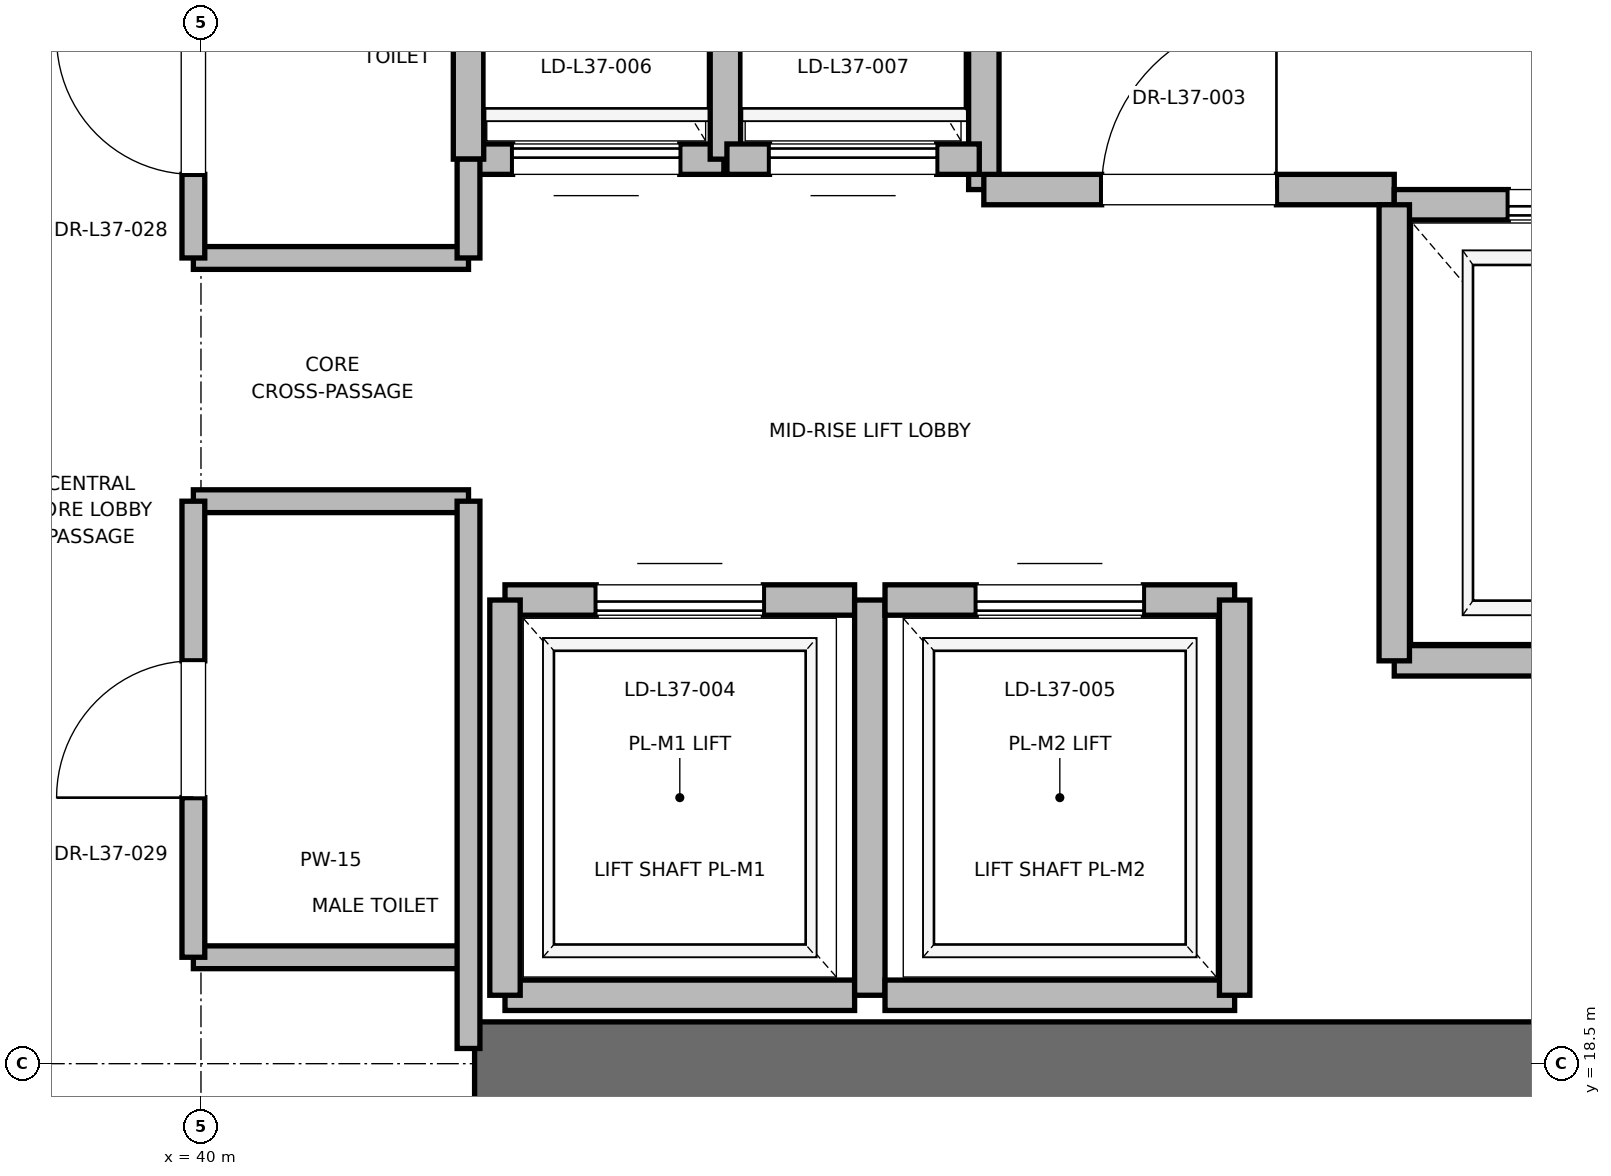
"""IFC4 building model, lengths in metres.
Left out: names, types, materials, properties, quantities, classifications, styles, units other than length and angle.
Written with IfcOpenShell. Run it as: python <this file> out.ifc"""

import sys

from ifc_helpers import new_model, si_unit, direction, frame, frame_2d, origin, place, context, subcontext, project, spatial, rectangle, extrude, element, fill, save


model = new_model("IFC4")
c1 = context("Model", 3, precision=1e-05, world=origin(), true_north=direction((0.0, 1.0)))
c2 = subcontext(c1, "Body", "Model", "MODEL_VIEW")
j1 = project(units=[si_unit("LENGTHUNIT", "METRE"), si_unit("PLANEANGLEUNIT", "RADIAN")], contexts=[c1])
p1 = place(None, origin())
s1 = spatial("IfcSite", under=j1, at=p1, CompositionType="ELEMENT")
p2 = place(p1, origin())
s2 = spatial("IfcBuilding", under=s1, at=p2, CompositionType="ELEMENT")
p3 = place(p2, frame((0.0, 0.0, 160.4)))
s3 = spatial("IfcBuildingStorey", under=s2, at=p3, CompositionType="ELEMENT", Elevation=160.4)
p4 = place(p3, frame((41.8, 18.5, 0.0), z_axis=(0.0, 0.0, 1.0), x_axis=(1.0, 0.0, 0.0)))
e1 = element("IfcWall", 1, at=p4, inside=s3, PredefinedType="SHEAR", context=c2, shape_type="SweptSolid", body=[
    extrude(rectangle(XDim=9.2, YDim=0.55, at=frame_2d((4.6, 0.0))), origin(), (0.0, 0.0, 1.0), 3.775),
])
p5 = place(p3, frame((45.15, 24.25, 0.0), z_axis=(0.0, 0.0, 1.0), x_axis=(0.0, 1.0, 0.0)))
e2 = element("IfcWall", 2, at=p5, inside=s3, PredefinedType="PARTITIONING", context=c2, shape_type="SweptSolid", body=[
    extrude(rectangle(XDim=3.37, YDim=0.2, at=frame_2d((1.685, 0.0))), origin(), (0.0, 0.0, 1.0), 3.775),
])
p6 = place(p3, frame((45.15, 24.25, 0.0), z_axis=(0.0, 0.0, 1.0), x_axis=(1.0, 0.0, 0.0)))
e3 = element("IfcWall", 3, at=p6, inside=s3, PredefinedType="PARTITIONING", context=c2, shape_type="SweptSolid", body=[
    extrude(rectangle(XDim=2.7, YDim=0.2, at=frame_2d((1.35, 0.0))), origin(), (0.0, 0.0, 1.0), 3.775),
])
p7 = place(p6, frame((0.775, 0.0, 0.0)))
e4 = element("IfcOpeningElement", 4, at=p7, cuts=e3, PredefinedType="OPENING", context=c2, shape_type="SweptSolid", body=[
    extrude(rectangle(XDim=1.15, YDim=2.2, at=frame_2d((0.575, 1.1))), frame((0.0, 0.1, 0.0), z_axis=(0.0, -1.0, 0.0), x_axis=(1.0, 0.0, 0.0)), (0.0, 0.0, 1.0), 0.2),
])
p8 = place(p3, frame((47.85, 21.15, 0.0), z_axis=(0.0, 0.0, 1.0), x_axis=(1.0, 0.0, 0.0)))
e5 = element("IfcWall", 5, at=p8, inside=s3, PredefinedType="SOLIDWALL", context=c2, shape_type="SweptSolid", body=[
    extrude(rectangle(XDim=2.6, YDim=0.2, at=frame_2d((1.3, 0.0))), origin(), (0.0, 0.0, 1.0), 3.775),
])
p9 = place(p3, frame((50.45, 24.15, 0.0), z_axis=(0.0, 0.0, 1.0), x_axis=(-1.0, 0.0, 0.0)))
e6 = element("IfcWall", 6, at=p9, inside=s3, PredefinedType="SOLIDWALL", context=c2, shape_type="SweptSolid", body=[
    extrude(rectangle(XDim=2.6, YDim=0.2, at=frame_2d((1.3, 0.0))), origin(), (0.0, 0.0, 1.0), 2.755),
])
p10 = place(p9, frame((0.75, 0.0, 0.0)))
e7 = element("IfcOpeningElement", 7, at=p10, cuts=e6, PredefinedType="OPENING", context=c2, shape_type="SweptSolid", body=[
    extrude(rectangle(XDim=1.1, YDim=2.2, at=frame_2d((0.55, 1.1))), frame((0.0, 0.1, 0.0), z_axis=(0.0, -1.0, 0.0), x_axis=(1.0, 0.0, 0.0)), (0.0, 0.0, 1.0), 0.2),
])
p11 = place(p3, frame((47.85, 24.15, 0.0), z_axis=(0.0, 0.0, 1.0), x_axis=(0.0, -1.0, 0.0)))
e8 = element("IfcWall", 8, at=p11, inside=s3, PredefinedType="SOLIDWALL", context=c2, shape_type="SweptSolid", body=[
    extrude(rectangle(XDim=3.0, YDim=0.2, at=frame_2d((1.5, 0.0))), origin(), (0.0, 0.0, 1.0), 3.775),
])
p12 = place(p3, frame((42.0, 18.95, 0.0), z_axis=(0.0, 0.0, 1.0), x_axis=(1.0, 0.0, 0.0)))
e9 = element("IfcWall", 9, at=p12, inside=s3, PredefinedType="SOLIDWALL", context=c2, shape_type="SweptSolid", body=[
    extrude(rectangle(XDim=2.3, YDim=0.2, at=frame_2d((1.15, 0.0))), origin(), (0.0, 0.0, 1.0), 2.755),
])
p13 = place(p3, frame((44.3, 21.55, 0.0), z_axis=(0.0, 0.0, 1.0), x_axis=(-1.0, 0.0, 0.0)))
e10 = element("IfcWall", 10, at=p13, inside=s3, PredefinedType="SOLIDWALL", context=c2, shape_type="SweptSolid", body=[
    extrude(rectangle(XDim=2.3, YDim=0.2, at=frame_2d((1.15, 0.0))), origin(), (0.0, 0.0, 1.0), 3.775),
])
p14 = place(p13, frame((0.6, 0.0, 0.0)))
e11 = element("IfcOpeningElement", 11, at=p14, cuts=e10, PredefinedType="OPENING", context=c2, shape_type="SweptSolid", body=[
    extrude(rectangle(XDim=1.1, YDim=2.2, at=frame_2d((0.55, 1.1))), frame((0.0, 0.1, 0.0), z_axis=(0.0, -1.0, 0.0), x_axis=(1.0, 0.0, 0.0)), (0.0, 0.0, 1.0), 0.2),
])
p15 = place(p3, frame((42.0, 21.55, 0.0), z_axis=(0.0, 0.0, 1.0), x_axis=(0.0, -1.0, 0.0)))
e12 = element("IfcWall", 12, at=p15, inside=s3, PredefinedType="SOLIDWALL", context=c2, shape_type="SweptSolid", body=[
    extrude(rectangle(XDim=2.6, YDim=0.2, at=frame_2d((1.3, 0.0))), origin(), (0.0, 0.0, 1.0), 2.755),
])
p16 = place(p3, frame((44.4, 18.95, 0.0), z_axis=(0.0, 0.0, 1.0), x_axis=(0.0, 1.0, 0.0)))
e13 = element("IfcWall", 13, at=p16, inside=s3, PredefinedType="SOLIDWALL", context=c2, shape_type="SweptSolid", body=[
    extrude(rectangle(XDim=2.6, YDim=0.2, at=frame_2d((1.3, 0.0))), origin(), (0.0, 0.0, 1.0), 3.775),
])
p17 = place(p3, frame((44.5, 18.95, 0.0), z_axis=(0.0, 0.0, 1.0), x_axis=(1.0, 0.0, 0.0)))
e14 = element("IfcWall", 14, at=p17, inside=s3, PredefinedType="SOLIDWALL", context=c2, shape_type="SweptSolid", body=[
    extrude(rectangle(XDim=2.3, YDim=0.2, at=frame_2d((1.15, 0.0))), origin(), (0.0, 0.0, 1.0), 3.775),
])
p18 = place(p3, frame((46.8, 21.55, 0.0), z_axis=(0.0, 0.0, 1.0), x_axis=(-1.0, 0.0, 0.0)))
e15 = element("IfcWall", 15, at=p18, inside=s3, PredefinedType="SOLIDWALL", context=c2, shape_type="SweptSolid", body=[
    extrude(rectangle(XDim=2.3, YDim=0.2, at=frame_2d((1.15, 0.0))), origin(), (0.0, 0.0, 1.0), 3.775),
])
p19 = place(p18, frame((0.6, 0.0, 0.0)))
e16 = element("IfcOpeningElement", 16, at=p19, cuts=e15, PredefinedType="OPENING", context=c2, shape_type="SweptSolid", body=[
    extrude(rectangle(XDim=1.1, YDim=2.2, at=frame_2d((0.55, 1.1))), frame((0.0, 0.1, 0.0), z_axis=(0.0, -1.0, 0.0), x_axis=(1.0, 0.0, 0.0)), (0.0, 0.0, 1.0), 0.2),
])
p20 = place(p3, frame((46.8, 18.95, 0.0), z_axis=(0.0, 0.0, 1.0), x_axis=(0.0, 1.0, 0.0)))
e17 = element("IfcWall", 17, at=p20, inside=s3, PredefinedType="SOLIDWALL", context=c2, shape_type="SweptSolid", body=[
    extrude(rectangle(XDim=2.6, YDim=0.2, at=frame_2d((1.3, 0.0))), origin(), (0.0, 0.0, 1.0), 3.775),
])
p21 = place(p3, frame((41.76, 24.45, 0.0), z_axis=(0.0, 0.0, 1.0), x_axis=(1.0, 0.0, 0.0)))
e18 = element("IfcWall", 18, at=p21, inside=s3, PredefinedType="SOLIDWALL", context=c2, shape_type="SweptSolid", body=[
    extrude(rectangle(XDim=1.68, YDim=0.2, at=frame_2d((0.84, 0.0))), origin(), (0.0, 0.0, 1.0), 3.775),
])
p22 = place(p21, frame((0.29, 0.0, 0.0)))
e19 = element("IfcOpeningElement", 19, at=p22, cuts=e18, PredefinedType="OPENING", context=c2, shape_type="SweptSolid", body=[
    extrude(rectangle(XDim=1.1, YDim=2.2, at=frame_2d((0.55, 1.1))), frame((0.0, 0.1, 0.0), z_axis=(0.0, -1.0, 0.0), x_axis=(1.0, 0.0, 0.0)), (0.0, 0.0, 1.0), 0.2),
])
for number, where, z_axis, x_axis in (
    (20, (41.76, 27.05, 0.0), (0.0, 0.0, 1.0), (0.0, -1.0, 0.0)),
    (21, (43.45, 24.45, 0.0), (0.0, 0.0, 1.0), (0.0, 1.0, 0.0)),
):
    element("IfcWall", number, at=place(p3, frame(where, z_axis=z_axis, x_axis=x_axis)), inside=s3, PredefinedType="SOLIDWALL", context=c2, shape_type="SweptSolid", body=[
        extrude(rectangle(XDim=2.6, YDim=0.2, at=frame_2d((1.3, 0.0))), origin(), (0.0, 0.0, 1.0), 3.775),
    ])
p23 = place(p3, frame((43.46, 24.45, 0.0), z_axis=(0.0, 0.0, 1.0), x_axis=(1.0, 0.0, 0.0)))
e22 = element("IfcWall", 22, at=p23, inside=s3, PredefinedType="SOLIDWALL", context=c2, shape_type="SweptSolid", body=[
    extrude(rectangle(XDim=1.66, YDim=0.2, at=frame_2d((0.83, 0.0))), origin(), (0.0, 0.0, 1.0), 3.775),
])
p24 = place(p23, frame((0.28, 0.0, 0.0)))
e23 = element("IfcOpeningElement", 23, at=p24, cuts=e22, PredefinedType="OPENING", context=c2, shape_type="SweptSolid", body=[
    extrude(rectangle(XDim=1.1, YDim=2.2, at=frame_2d((0.55, 1.1))), frame((0.0, 0.1, 0.0), z_axis=(0.0, -1.0, 0.0), x_axis=(1.0, 0.0, 0.0)), (0.0, 0.0, 1.0), 0.2),
])
for number, where, z_axis, x_axis in (
    (24, (39.95, 19.2, 0.0), (0.0, 0.0, 1.0), (1.0, 0.0, 0.0)),
    (25, (39.95, 22.2, 0.0), (0.0, 0.0, 1.0), (1.0, 0.0, 0.0)),
    (26, (39.95, 23.8, 0.0), (0.0, 0.0, 1.0), (1.0, 0.0, 0.0)),
):
    element("IfcWall", number, at=place(p3, frame(where, z_axis=z_axis, x_axis=x_axis)), inside=s3, PredefinedType="PARTITIONING", context=c2, shape_type="SweptSolid", body=[
        extrude(rectangle(XDim=1.81, YDim=0.15, at=frame_2d((0.905, 0.0))), origin(), (0.0, 0.0, 1.0), 2.85),
    ])
p25 = place(p3, frame((41.76, 18.6, 0.0), z_axis=(0.0, 0.0, 1.0), x_axis=(0.0, 1.0, 0.0)))
e27 = element("IfcWall", 27, at=p25, inside=s3, PredefinedType="PARTITIONING", context=c2, shape_type="SweptSolid", body=[
    extrude(rectangle(XDim=3.6, YDim=0.15, at=frame_2d((1.8, 0.0))), origin(), (0.0, 0.0, 1.0), 2.755),
])
p26 = place(p3, frame((41.76, 23.8, 0.0), z_axis=(0.0, 0.0, 1.0), x_axis=(0.0, 1.0, 0.0)))
e28 = element("IfcWall", 28, at=p26, inside=s3, PredefinedType="PARTITIONING", context=c2, shape_type="SweptSolid", body=[
    extrude(rectangle(XDim=0.65, YDim=0.15, at=frame_2d((0.325, 0.0))), origin(), (0.0, 0.0, 1.0), 2.85),
])
p27 = place(p3, frame((39.95, 19.2, 0.0), z_axis=(0.0, 0.0, 1.0), x_axis=(0.0, 1.0, 0.0)))
e29 = element("IfcWall", 29, at=p27, inside=s3, PredefinedType="PARTITIONING", context=c2, shape_type="SweptSolid", body=[
    extrude(rectangle(XDim=3.0, YDim=0.15, at=frame_2d((1.5, 0.0))), origin(), (0.0, 0.0, 1.0), 2.85),
])
p28 = place(p27, frame((1.05, 0.0, 0.0)))
e30 = element("IfcOpeningElement", 30, at=p28, cuts=e29, PredefinedType="OPENING", context=c2, shape_type="SweptSolid", body=[
    extrude(rectangle(XDim=0.9, YDim=2.1, at=frame_2d((0.45, 1.05))), frame((0.0, 0.075, 0.0), z_axis=(0.0, -1.0, 0.0), x_axis=(1.0, 0.0, 0.0)), (0.0, 0.0, 1.0), 0.15),
])
p29 = place(p3, frame((39.95, 23.8, 0.0), z_axis=(0.0, 0.0, 1.0), x_axis=(0.0, 1.0, 0.0)))
e31 = element("IfcWall", 31, at=p29, inside=s3, PredefinedType="PARTITIONING", context=c2, shape_type="SweptSolid", body=[
    extrude(rectangle(XDim=2.0, YDim=0.15, at=frame_2d((1.0, 0.0))), origin(), (0.0, 0.0, 1.0), 2.85),
])
p30 = place(p29, frame((0.55, 0.0, 0.0)))
e32 = element("IfcOpeningElement", 32, at=p30, cuts=e31, PredefinedType="OPENING", context=c2, shape_type="SweptSolid", body=[
    extrude(rectangle(XDim=0.9, YDim=2.1, at=frame_2d((0.45, 1.05))), frame((0.0, 0.075, 0.0), z_axis=(0.0, -1.0, 0.0), x_axis=(1.0, 0.0, 0.0)), (0.0, 0.0, 1.0), 0.15),
])
p31 = place(p7, origin())
e33 = element("IfcDoor", 33, at=p31, inside=s3, OperationType="SINGLE_SWING_RIGHT", PredefinedType="DOOR", context=c2, shape_type="SweptSolid", body=[
    extrude(rectangle(XDim=1.15, YDim=2.2, at=frame_2d((0.575, 1.1))), frame((0.0, 0.025, 0.0), z_axis=(0.0, -1.0, 0.0), x_axis=(1.0, 0.0, 0.0)), (0.0, 0.0, 1.0), 0.05),
])
fill(e4, e33)
p32 = place(p10, origin())
e34 = element("IfcDoor", 34, at=p32, inside=s3, OperationType="SLIDING_TO_RIGHT", PredefinedType="DOOR", context=c2, shape_type="SweptSolid", body=[
    extrude(rectangle(XDim=1.1, YDim=2.2, at=frame_2d((0.55, 1.1))), frame((0.0, 0.025, 0.0), z_axis=(0.0, -1.0, 0.0), x_axis=(1.0, 0.0, 0.0)), (0.0, 0.0, 1.0), 0.05),
])
fill(e7, e34)
p33 = place(p14, origin())
e35 = element("IfcDoor", 35, at=p33, inside=s3, OperationType="SLIDING_TO_RIGHT", PredefinedType="DOOR", context=c2, shape_type="SweptSolid", body=[
    extrude(rectangle(XDim=1.1, YDim=2.2, at=frame_2d((0.55, 1.1))), frame((0.0, 0.025, 0.0), z_axis=(0.0, -1.0, 0.0), x_axis=(1.0, 0.0, 0.0)), (0.0, 0.0, 1.0), 0.05),
])
fill(e11, e35)
p34 = place(p19, origin())
e36 = element("IfcDoor", 36, at=p34, inside=s3, OperationType="SLIDING_TO_RIGHT", PredefinedType="DOOR", context=c2, shape_type="SweptSolid", body=[
    extrude(rectangle(XDim=1.1, YDim=2.2, at=frame_2d((0.55, 1.1))), frame((0.0, 0.025, 0.0), z_axis=(0.0, -1.0, 0.0), x_axis=(1.0, 0.0, 0.0)), (0.0, 0.0, 1.0), 0.05),
])
fill(e16, e36)
p35 = place(p22, origin())
e37 = element("IfcDoor", 37, at=p35, inside=s3, OperationType="SLIDING_TO_RIGHT", PredefinedType="DOOR", context=c2, shape_type="SweptSolid", body=[
    extrude(rectangle(XDim=1.1, YDim=2.2, at=frame_2d((0.55, 1.1))), frame((0.0, 0.025, 0.0), z_axis=(0.0, -1.0, 0.0), x_axis=(1.0, 0.0, 0.0)), (0.0, 0.0, 1.0), 0.05),
])
fill(e19, e37)
p36 = place(p24, origin())
e38 = element("IfcDoor", 38, at=p36, inside=s3, OperationType="SLIDING_TO_RIGHT", PredefinedType="DOOR", context=c2, shape_type="SweptSolid", body=[
    extrude(rectangle(XDim=1.1, YDim=2.2, at=frame_2d((0.55, 1.1))), frame((0.0, 0.025, 0.0), z_axis=(0.0, -1.0, 0.0), x_axis=(1.0, 0.0, 0.0)), (0.0, 0.0, 1.0), 0.05),
])
fill(e23, e38)
p37 = place(p28, origin())
e39 = element("IfcDoor", 39, at=p37, inside=s3, OperationType="SINGLE_SWING_LEFT", PredefinedType="DOOR", context=c2, shape_type="SweptSolid", body=[
    extrude(rectangle(XDim=0.9, YDim=2.1, at=frame_2d((0.45, 1.05))), frame((0.0, 0.025, 0.0), z_axis=(0.0, -1.0, 0.0), x_axis=(1.0, 0.0, 0.0)), (0.0, 0.0, 1.0), 0.05),
])
fill(e30, e39)
p38 = place(p30, origin())
e40 = element("IfcDoor", 40, at=p38, inside=s3, OperationType="SINGLE_SWING_RIGHT", PredefinedType="DOOR", context=c2, shape_type="SweptSolid", body=[
    extrude(rectangle(XDim=0.9, YDim=2.1, at=frame_2d((0.45, 1.05))), frame((0.0, 0.025, 0.0), z_axis=(0.0, -1.0, 0.0), x_axis=(1.0, 0.0, 0.0)), (0.0, 0.0, 1.0), 0.05),
])
fill(e32, e40)
save(model, sys.argv[1])
